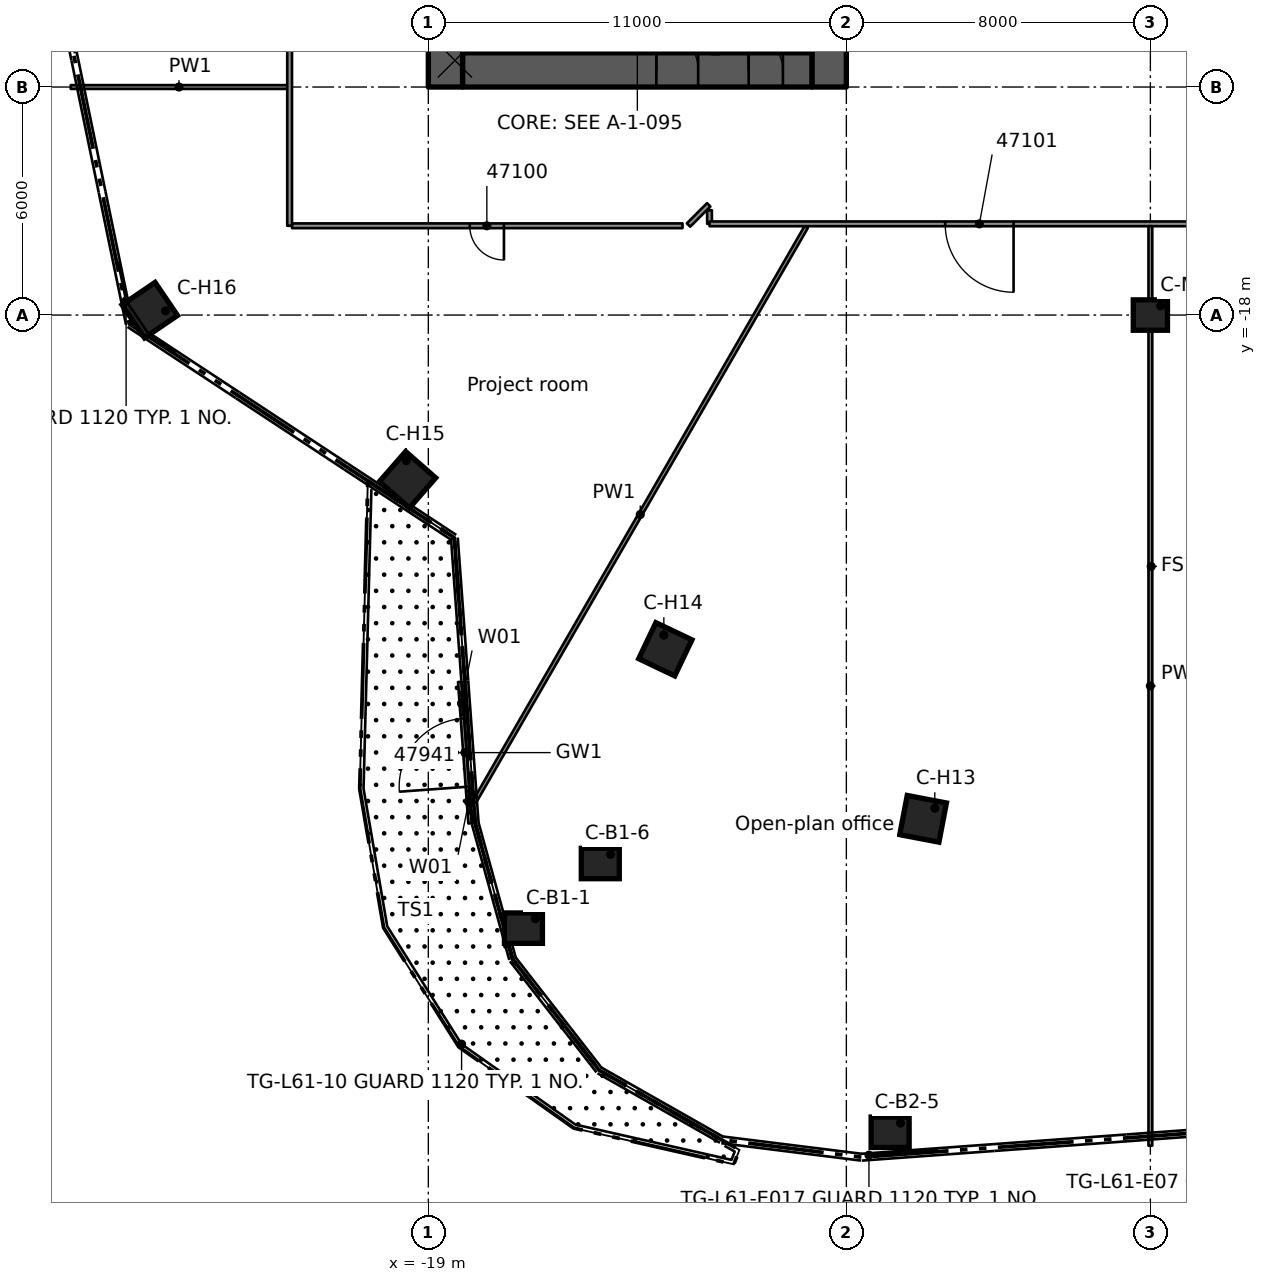
"""IFC4 building model, lengths in metres.
Left out: names, types, materials, properties, quantities, classifications, styles, units other than length and angle.
Written with IfcOpenShell. Run it as: python <this file> out.ifc"""

import sys

from ifc_helpers import new_model, si_unit, direction, frame, frame_2d, origin, origin_2d, place, context, subcontext, project, spatial, rectangle, extrude, element, fill, save


model = new_model("IFC4")
c1 = context("Model", 3, precision=1e-05, world=origin(), true_north=direction((0.0, 1.0)))
c2 = subcontext(c1, "Body", "Model", "MODEL_VIEW")
j1 = project(units=[si_unit("LENGTHUNIT", "METRE"), si_unit("PLANEANGLEUNIT", "RADIAN")], contexts=[c1])
p1 = place(None, origin())
s1 = spatial("IfcSite", under=j1, at=p1, CompositionType="ELEMENT")
p2 = place(p1, origin())
s2 = spatial("IfcBuilding", under=s1, at=p2, CompositionType="ELEMENT")
p3 = place(p2, frame((0.0, 0.0, 232.0)))
s3 = spatial("IfcBuildingStorey", under=s2, at=p3, CompositionType="ELEMENT", Elevation=232.0)
p4 = place(p3, frame((-18.1, -11.55, 0.0), z_axis=(0.0, 0.0, 1.0), x_axis=(1.0, 0.0, 0.0)))
e1 = element("IfcWall", 1, at=p4, inside=s3, PredefinedType="SHEAR", context=c2, shape_type="SweptSolid", body=[
    extrude(rectangle(XDim=9.2, YDim=0.9, at=frame_2d((4.6, 0.0))), origin(), (0.0, 0.0, 1.0), 3.5),
])
p5 = place(p4, frame((5.1, 0.0, 0.0)))
e2 = element("IfcOpeningElement", 2, at=p5, cuts=e1, PredefinedType="OPENING", context=c2, shape_type="SweptSolid", body=[
    extrude(rectangle(XDim=1.1, YDim=2.1, at=frame_2d((0.55, 1.05))), frame((0.0, 0.46, 0.0), z_axis=(0.0, -1.0, 0.0), x_axis=(1.0, 0.0, 0.0)), (0.0, 0.0, 1.0), 0.92),
])
p6 = place(p4, frame((7.53, 0.0, 0.0)))
e3 = element("IfcOpeningElement", 3, at=p6, cuts=e1, PredefinedType="OPENING", context=c2, shape_type="SweptSolid", body=[
    extrude(rectangle(XDim=0.9, YDim=2.1, at=frame_2d((0.45, 1.05))), frame((0.0, 0.46, 0.0), z_axis=(0.0, -1.0, 0.0), x_axis=(1.0, 0.0, 0.0)), (0.0, 0.0, 1.0), 0.92),
])
p7 = place(p3, frame((-18.55, -12.0, 0.0), z_axis=(0.0, 0.0, 1.0), x_axis=(0.0, 1.0, 0.0)))
e4 = element("IfcWall", 4, at=p7, inside=s3, PredefinedType="SHEAR", context=c2, shape_type="SweptSolid", body=[
    extrude(rectangle(XDim=24.0, YDim=0.9, at=frame_2d((12.0, 0.0))), origin(), (0.0, 0.0, 1.0), 3.5),
])
p8 = place(p7, frame((10.1, 0.0, 0.0)))
e5 = element("IfcOpeningElement", 5, at=p8, cuts=e4, PredefinedType="OPENING", context=c2, shape_type="SweptSolid", body=[
    extrude(rectangle(XDim=1.8, YDim=2.1, at=frame_2d((0.9, 1.05))), frame((0.0, 0.46, 0.0), z_axis=(0.0, -1.0, 0.0), x_axis=(1.0, 0.0, 0.0)), (0.0, 0.0, 1.0), 0.92),
])
p9 = place(p3, frame((-8.45, -12.0, 0.0), z_axis=(0.0, 0.0, 1.0), x_axis=(0.0, 1.0, 0.0)))
e6 = element("IfcWall", 6, at=p9, inside=s3, PredefinedType="SHEAR", context=c2, shape_type="SweptSolid", body=[
    extrude(rectangle(XDim=24.0, YDim=0.9, at=frame_2d((12.0, 0.0))), origin(), (0.0, 0.0, 1.0), 3.5),
])
p10 = place(p9, frame((9.6, 0.0, 0.0)))
e7 = element("IfcOpeningElement", 7, at=p10, cuts=e6, PredefinedType="OPENING", context=c2, shape_type="SweptSolid", body=[
    extrude(rectangle(XDim=1.8, YDim=2.1, at=frame_2d((0.9, 1.05))), frame((0.0, 0.46, 0.0), z_axis=(0.0, -1.0, 0.0), x_axis=(1.0, 0.0, 0.0)), (0.0, 0.0, 1.0), 0.92),
])
p11 = place(p9, frame((19.65, 0.0, 0.0)))
e8 = element("IfcOpeningElement", 8, at=p11, cuts=e6, PredefinedType="OPENING", context=c2, shape_type="SweptSolid", body=[
    extrude(rectangle(XDim=1.1, YDim=2.1, at=frame_2d((0.55, 1.05))), frame((0.0, 0.46, 0.0), z_axis=(0.0, -1.0, 0.0), x_axis=(1.0, 0.0, 0.0)), (0.0, 0.0, 1.0), 0.92),
])
p12 = place(p9, frame((2.2, 0.0, 0.0)))
e9 = element("IfcOpeningElement", 9, at=p12, cuts=e6, PredefinedType="OPENING", context=c2, shape_type="SweptSolid", body=[
    extrude(rectangle(XDim=0.8, YDim=2.1, at=frame_2d((0.4, 1.05))), frame((0.0, 0.46, 0.0), z_axis=(0.0, -1.0, 0.0), x_axis=(1.0, 0.0, 0.0)), (0.0, 0.0, 1.0), 0.92),
])
for number, where, z_axis, x_axis in (
    (10, (-16.497, -34.132, 0.0), (0.0, 0.0, 1.0), (1.0, 0.0, 0.0)),
    (11, (-14.475, -32.431, 0.0), (0.0, 0.0, 1.0), (1.0, 0.0, 0.0)),
    (12, (-6.848, -39.502, 0.0), (0.0, 0.0, 1.0), (1.0, 0.0, 0.0)),
):
    element("IfcColumn", number, at=place(p3, frame(where, z_axis=z_axis, x_axis=x_axis)), inside=s3, PredefinedType="COLUMN", context=c2, shape_type="SweptSolid", body=[
        extrude(rectangle(XDim=1.0, YDim=0.8, at=origin_2d()), origin(), (0.0, 0.0, 1.0), 3.5),
    ])
for number, where, z_axis, x_axis in (
    (13, (-5.981, -31.255, 0.0), (0.0, 0.0, 1.0), (-0.188, -0.982, 0.0)),
    (14, (-12.764, -26.794, 0.0), (0.0, 0.0, 1.0), (-0.43, -0.903, 0.0)),
    (15, (-19.547, -22.333, 0.0), (0.0, 0.0, 1.0), (-0.659, -0.752, 0.0)),
    (16, (-26.33, -17.871, 0.0), (0.0, 0.0, 1.0), (-0.827, -0.562, 0.0)),
):
    element("IfcColumn", number, at=place(p3, frame(where, z_axis=z_axis, x_axis=x_axis)), inside=s3, PredefinedType="COLUMN", context=c2, shape_type="SweptSolid", body=[
        extrude(rectangle(XDim=1.05, YDim=1.05, at=origin_2d()), origin(), (0.0, 0.0, 1.0), 3.5),
    ])
p13 = place(p3, frame((0.0, -18.0, 0.0), z_axis=(0.0, 0.0, 1.0), x_axis=(1.0, 0.0, 0.0)))
e17 = element("IfcColumn", 17, at=p13, inside=s3, PredefinedType="COLUMN", context=c2, shape_type="SweptSolid", body=[
    extrude(rectangle(XDim=0.9, YDim=0.8, at=origin_2d()), origin(), (0.0, 0.0, 1.0), 3.5),
])
p14 = place(p3, frame((-11.44, -11.1, 0.0), z_axis=(0.0, 0.0, 1.0), x_axis=(0.0, 1.0, 0.0)))
e18 = element("IfcWall", 18, at=p14, inside=s3, PredefinedType="SOLIDWALL", context=c2, shape_type="SweptSolid", body=[
    extrude(rectangle(XDim=4.125, YDim=0.2, at=frame_2d((2.062, 0.0))), origin(), (0.0, 0.0, 1.0), 3.09),
])
p15 = place(p3, frame((-17.897, -31.375, 0.0), z_axis=(0.0, 0.0, 1.0), x_axis=(-0.072799499053, 0.997346596193, 0.0)))
e19 = element("IfcWall", 19, at=p15, inside=s3, PredefinedType="STANDARD", context=c2, shape_type="SweptSolid", body=[
    extrude(rectangle(XDim=3.733, YDim=0.1, at=frame_2d((1.866, 0.0))), origin(), (0.0, 0.0, 1.0), 3.1),
])
p16 = place(p15, frame((0.966, 0.0, 0.0)))
e20 = element("IfcOpeningElement", 20, at=p16, cuts=e19, PredefinedType="OPENING", context=c2, shape_type="SweptSolid", body=[
    extrude(rectangle(XDim=1.8, YDim=2.4, at=frame_2d((0.9, 1.2))), frame((0.0, 0.06, 0.0), z_axis=(0.0, -1.0, 0.0), x_axis=(1.0, 0.0, 0.0)), (0.0, 0.0, 1.0), 0.12),
])
p17 = place(p15, frame((0.266, 0.0, 0.0)))
e21 = element("IfcOpeningElement", 21, at=p17, cuts=e19, PredefinedType="OPENING", context=c2, shape_type="SweptSolid", body=[
    extrude(rectangle(XDim=0.6, YDim=2.4, at=frame_2d((0.3, 1.2))), frame((0.0, 0.06, 0.0), z_axis=(0.0, -1.0, 0.0), x_axis=(1.0, 0.0, 0.0)), (0.0, 0.0, 1.0), 0.12),
])
p18 = place(p15, frame((2.866, 0.0, 0.0)))
e22 = element("IfcOpeningElement", 22, at=p18, cuts=e19, PredefinedType="OPENING", context=c2, shape_type="SweptSolid", body=[
    extrude(rectangle(XDim=0.6, YDim=2.4, at=frame_2d((0.3, 1.2))), frame((0.0, 0.06, 0.0), z_axis=(0.0, -1.0, 0.0), x_axis=(1.0, 0.0, 0.0)), (0.0, 0.0, 1.0), 0.12),
])
p19 = place(p3, frame((-11.601, -15.242, 0.0), z_axis=(0.0, 0.0, 1.0), x_axis=(0.002726642898, -0.999996282702, 0.0)))
e23 = element("IfcWall", 23, at=p19, inside=s3, PredefinedType="PARTITIONING", context=c2, shape_type="SweptSolid", body=[
    extrude(rectangle(XDim=0.358, YDim=0.125, at=frame_2d((0.179, 0.0))), origin(), (0.0, 0.0, 1.0), 3.08),
])
p20 = place(p3, frame((-12.311, -15.651, 0.0), z_axis=(0.0, 0.0, 1.0), x_axis=(-1.0, 0.0, 0.0)))
e24 = element("IfcWall", 24, at=p20, inside=s3, PredefinedType="PARTITIONING", context=c2, shape_type="SweptSolid", body=[
    extrude(rectangle(XDim=10.276, YDim=0.125, at=frame_2d((5.138, 0.0))), origin(), (0.0, 0.0, 1.0), 3.08),
])
p21 = place(p20, frame((4.699, 0.0, 0.0)))
e25 = element("IfcOpeningElement", 25, at=p21, cuts=e24, PredefinedType="OPENING", context=c2, shape_type="SweptSolid", body=[
    extrude(rectangle(XDim=0.9, YDim=2.1, at=frame_2d((0.45, 1.05))), frame((0.0, 0.073, 0.0), z_axis=(0.0, -1.0, 0.0), x_axis=(1.0, 0.0, 0.0)), (0.0, 0.0, 1.0), 0.145),
])
p22 = place(p3, frame((11.539, -15.6, 0.0), z_axis=(0.0, 0.0, 1.0), x_axis=(-1.0, 0.0, 0.0)))
e26 = element("IfcWall", 26, at=p22, inside=s3, PredefinedType="PARTITIONING", context=c2, shape_type="SweptSolid", body=[
    extrude(rectangle(XDim=23.139, YDim=0.125, at=frame_2d((11.57, 0.0))), origin(), (0.0, 0.0, 1.0), 3.08),
])
p23 = place(p22, frame((15.138, 0.0, 0.0)))
e27 = element("IfcOpeningElement", 27, at=p23, cuts=e26, PredefinedType="OPENING", context=c2, shape_type="SweptSolid", body=[
    extrude(rectangle(XDim=1.8, YDim=2.1, at=frame_2d((0.9, 1.05))), frame((0.0, 0.073, 0.0), z_axis=(0.0, -1.0, 0.0), x_axis=(1.0, 0.0, 0.0)), (0.0, 0.0, 1.0), 0.145),
])
p24 = place(p22, frame((6.132, 0.0, 0.0)))
e28 = element("IfcOpeningElement", 28, at=p24, cuts=e26, PredefinedType="OPENING", context=c2, shape_type="SweptSolid", body=[
    extrude(rectangle(XDim=1.8, YDim=2.1, at=frame_2d((0.9, 1.05))), frame((0.0, 0.073, 0.0), z_axis=(0.0, -1.0, 0.0), x_axis=(1.0, 0.0, 0.0)), (0.0, 0.0, 1.0), 0.145),
])
p25 = place(p3, frame((-28.41, -12.0, 0.0), z_axis=(0.0, 0.0, 1.0), x_axis=(1.0, 0.0, 0.0)))
e29 = element("IfcWall", 29, at=p25, inside=s3, PredefinedType="PARTITIONING", context=c2, shape_type="SweptSolid", body=[
    extrude(rectangle(XDim=5.698, YDim=0.1, at=frame_2d((2.849, 0.0))), origin(), (0.0, 0.0, 1.0), 3.08),
])
p26 = place(p3, frame((-12.153, -15.631, 0.0), z_axis=(0.0, 0.0, 1.0), x_axis=(0.707106781187, 0.707106781187, 0.0)))
e30 = element("IfcWall", 30, at=p26, inside=s3, PredefinedType="PARTITIONING", context=c2, shape_type="SweptSolid", body=[
    extrude(rectangle(XDim=0.751, YDim=0.125, at=frame_2d((0.375, 0.0))), origin(), (0.0, 0.0, 1.0), 3.08),
])
p27 = place(p3, frame((-17.789, -30.811, 0.0), z_axis=(0.0, 0.0, 1.0), x_axis=(0.499961262263, 0.866047767872, 0.0)))
e31 = element("IfcWall", 31, at=p27, inside=s3, PredefinedType="PARTITIONING", context=c2, shape_type="SweptSolid", body=[
    extrude(rectangle(XDim=17.463, YDim=0.1, at=frame_2d((8.732, 0.0))), origin(), (0.0, 0.0, 1.0), 3.08),
])
p28 = place(p3, frame((0.0, -39.856, 0.0), z_axis=(0.0, 0.0, 1.0), x_axis=(0.0, 1.0, 0.0)))
e32 = element("IfcWall", 32, at=p28, inside=s3, PredefinedType="PARTITIONING", context=c2, shape_type="SweptSolid", body=[
    extrude(rectangle(XDim=24.194, YDim=0.1, at=frame_2d((12.097, 0.0))), origin(), (0.0, 0.0, 1.0), 3.08),
])
p29 = place(p3, frame((-22.65, -15.651, 0.0), z_axis=(0.0, 0.0, 1.0), x_axis=(0.0, 1.0, 0.0)))
e33 = element("IfcWall", 33, at=p29, inside=s3, PredefinedType="PARTITIONING", context=c2, shape_type="SweptSolid", body=[
    extrude(rectangle(XDim=31.302, YDim=0.125, at=frame_2d((15.651, 0.0))), origin(), (0.0, 0.0, 1.0), 3.08),
])
p30 = place(p29, frame((11.751, 0.0, 0.0)))
e34 = element("IfcOpeningElement", 34, at=p30, cuts=e33, PredefinedType="OPENING", context=c2, shape_type="SweptSolid", body=[
    extrude(rectangle(XDim=1.8, YDim=2.1, at=frame_2d((0.9, 1.05))), frame((0.0, 0.073, 0.0), z_axis=(0.0, -1.0, 0.0), x_axis=(1.0, 0.0, 0.0)), (0.0, 0.0, 1.0), 0.145),
])
p31 = place(p29, frame((24.252, 0.0, 0.0)))
e35 = element("IfcOpeningElement", 35, at=p31, cuts=e33, PredefinedType="OPENING", context=c2, shape_type="SweptSolid", body=[
    extrude(rectangle(XDim=0.9, YDim=2.1, at=frame_2d((0.45, 1.05))), frame((0.0, 0.073, 0.0), z_axis=(0.0, -1.0, 0.0), x_axis=(1.0, 0.0, 0.0)), (0.0, 0.0, 1.0), 0.145),
])
p32 = place(p5, origin())
e36 = element("IfcDoor", 36, at=p32, inside=s3, OperationType="SINGLE_SWING_RIGHT", PredefinedType="DOOR", context=c2, shape_type="SweptSolid", body=[
    extrude(rectangle(XDim=1.1, YDim=2.1, at=frame_2d((0.55, 1.05))), frame((0.0, 0.025, 0.0), z_axis=(0.0, -1.0, 0.0), x_axis=(1.0, 0.0, 0.0)), (0.0, 0.0, 1.0), 0.05),
])
fill(e2, e36)
p33 = place(p6, origin())
e37 = element("IfcDoor", 37, at=p33, inside=s3, OperationType="SINGLE_SWING_RIGHT", PredefinedType="DOOR", context=c2, shape_type="SweptSolid", body=[
    extrude(rectangle(XDim=0.9, YDim=2.1, at=frame_2d((0.45, 1.05))), frame((0.0, 0.025, 0.0), z_axis=(0.0, -1.0, 0.0), x_axis=(1.0, 0.0, 0.0)), (0.0, 0.0, 1.0), 0.05),
])
fill(e3, e37)
p34 = place(p16, origin())
e38 = element("IfcDoor", 38, at=p34, inside=s3, OperationType="DOUBLE_DOOR_SINGLE_SWING", PredefinedType="DOOR", context=c2, shape_type="SweptSolid", body=[
    extrude(rectangle(XDim=1.8, YDim=2.4, at=frame_2d((0.9, 1.2))), frame((0.0, 0.025, 0.0), z_axis=(0.0, -1.0, 0.0), x_axis=(1.0, 0.0, 0.0)), (0.0, 0.0, 1.0), 0.05),
])
fill(e20, e38)
p35 = place(p17, origin())
e39 = element("IfcWindow", 39, at=p35, inside=s3, PartitioningType="SINGLE_PANEL", PredefinedType="WINDOW", context=c2, shape_type="SweptSolid", body=[
    extrude(rectangle(XDim=0.6, YDim=2.4, at=frame_2d((0.3, 1.2))), frame((0.0, 0.03, 0.0), z_axis=(0.0, -1.0, 0.0), x_axis=(1.0, 0.0, 0.0)), (0.0, 0.0, 1.0), 0.06),
])
fill(e21, e39)
p36 = place(p18, origin())
e40 = element("IfcWindow", 40, at=p36, inside=s3, PartitioningType="SINGLE_PANEL", PredefinedType="WINDOW", context=c2, shape_type="SweptSolid", body=[
    extrude(rectangle(XDim=0.6, YDim=2.4, at=frame_2d((0.3, 1.2))), frame((0.0, 0.03, 0.0), z_axis=(0.0, -1.0, 0.0), x_axis=(1.0, 0.0, 0.0)), (0.0, 0.0, 1.0), 0.06),
])
fill(e22, e40)
p37 = place(p21, origin())
e41 = element("IfcDoor", 41, at=p37, inside=s3, OperationType="SINGLE_SWING_RIGHT", PredefinedType="DOOR", context=c2, shape_type="SweptSolid", body=[
    extrude(rectangle(XDim=0.9, YDim=2.1, at=frame_2d((0.45, 1.05))), frame((0.0, 0.025, 0.0), z_axis=(0.0, -1.0, 0.0), x_axis=(1.0, 0.0, 0.0)), (0.0, 0.0, 1.0), 0.05),
])
fill(e25, e41)
p38 = place(p23, origin())
e42 = element("IfcDoor", 42, at=p38, inside=s3, OperationType="DOUBLE_DOOR_SINGLE_SWING", PredefinedType="DOOR", context=c2, shape_type="SweptSolid", body=[
    extrude(rectangle(XDim=1.8, YDim=2.1, at=frame_2d((0.9, 1.05))), frame((0.0, 0.025, 0.0), z_axis=(0.0, -1.0, 0.0), x_axis=(1.0, 0.0, 0.0)), (0.0, 0.0, 1.0), 0.05),
])
fill(e27, e42)
save(model, sys.argv[1])
